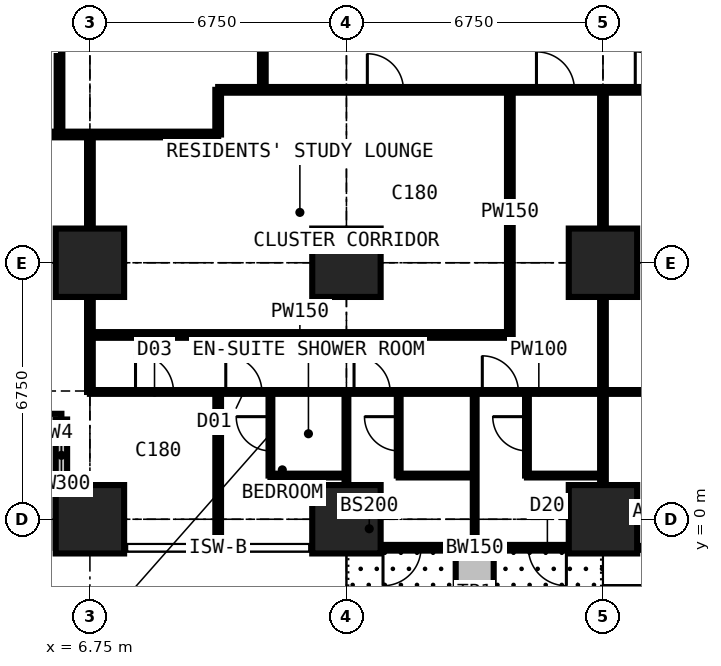
"""IFC4 building model, lengths in metres.
Left out: names, types, materials, properties, quantities, classifications, styles, units other than length and angle.
Written with IfcOpenShell. Run it as: python <this file> out.ifc"""

import sys

from ifc_helpers import new_model, si_unit, direction, frame, frame_2d, origin, origin_2d, place, context, subcontext, project, spatial, rectangle, extrude, element, fill, save


model = new_model("IFC4")
c1 = context("Model", 3, precision=1e-05, world=origin(), true_north=direction((0.0, 1.0)))
c2 = subcontext(c1, "Body", "Model", "MODEL_VIEW")
j1 = project(units=[si_unit("LENGTHUNIT", "METRE"), si_unit("PLANEANGLEUNIT", "RADIAN")], contexts=[c1])
p1 = place(None, origin())
s1 = spatial("IfcSite", under=j1, at=p1, CompositionType="ELEMENT")
p2 = place(p1, origin())
s2 = spatial("IfcBuilding", under=s1, at=p2, CompositionType="ELEMENT")
p3 = place(p2, frame((0.0, 0.0, 87.3)))
s3 = spatial("IfcBuildingStorey", under=s2, at=p3, CompositionType="ELEMENT", Elevation=87.3)
for number, where, z_axis, x_axis in (
    (1, (6.75, 0.0, 0.0), (0.0, 0.0, 1.0), (1.0, 0.0, 0.0)),
    (2, (6.75, 6.75, 0.0), (0.0, 0.0, 1.0), (1.0, 0.0, 0.0)),
    (3, (13.5, 0.0, 0.0), (0.0, 0.0, 1.0), (1.0, 0.0, 0.0)),
    (4, (13.5, 6.75, 0.0), (0.0, 0.0, 1.0), (1.0, 0.0, 0.0)),
    (5, (20.25, 0.0, 0.0), (0.0, 0.0, 1.0), (1.0, 0.0, 0.0)),
    (6, (20.25, 6.75, 0.0), (0.0, 0.0, 1.0), (1.0, 0.0, 0.0)),
):
    element("IfcColumn", number, at=place(p3, frame(where, z_axis=z_axis, x_axis=x_axis)), inside=s3, PredefinedType="COLUMN", context=c2, shape_type="SweptSolid", body=[
        extrude(rectangle(XDim=1.8, YDim=1.8, at=origin_2d()), origin(), (0.0, 0.0, 1.0), 3.6),
    ])
p4 = place(p3, frame((2.625, 2.625, 0.0), z_axis=(0.0, 0.0, 1.0), x_axis=(1.0, 0.0, 0.0)))
e7 = element("IfcWall", 7, at=p4, inside=s3, PredefinedType="SOLIDWALL", context=c2, shape_type="SweptSolid", body=[
    extrude(rectangle(XDim=3.375, YDim=0.3, at=frame_2d((1.688, 0.0))), origin(), (0.0, 0.0, 1.0), 3.375),
])
p5 = place(p4, frame((0.788, 0.0, 0.6)))
e8 = element("IfcOpeningElement", 8, at=p5, cuts=e7, PredefinedType="OPENING", context=c2, shape_type="SweptSolid", body=[
    extrude(rectangle(XDim=1.8, YDim=2.1, at=frame_2d((0.9, 1.05))), frame((0.0, 0.16, 0.0), z_axis=(0.0, -1.0, 0.0), x_axis=(1.0, 0.0, 0.0)), (0.0, 0.0, 1.0), 0.32),
])
p6 = place(p3, frame((6.0, 2.625, 0.0), z_axis=(0.0, 0.0, 1.0), x_axis=(0.0, -1.0, 0.0)))
e9 = element("IfcWall", 9, at=p6, inside=s3, PredefinedType="SOLIDWALL", context=c2, shape_type="SweptSolid", body=[
    extrude(rectangle(XDim=3.375, YDim=0.3, at=frame_2d((1.688, 0.0))), origin(), (0.0, 0.0, 1.0), 3.375),
])
p7 = place(p6, frame((0.343, 0.0, 0.9)))
e10 = element("IfcOpeningElement", 10, at=p7, cuts=e9, PredefinedType="OPENING", context=c2, shape_type="SweptSolid", body=[
    extrude(rectangle(XDim=1.2, YDim=1.8, at=frame_2d((0.6, 0.9))), frame((0.0, 0.16, 0.0), z_axis=(0.0, -1.0, 0.0), x_axis=(1.0, 0.0, 0.0)), (0.0, 0.0, 1.0), 0.32),
])
p8 = place(p3, frame((20.25, -0.75, 0.0), z_axis=(0.0, 0.0, 1.0), x_axis=(-1.0, 0.0, 0.0)))
e11 = element("IfcWall", 11, at=p8, inside=s3, PredefinedType="SOLIDWALL", context=c2, shape_type="SweptSolid", body=[
    extrude(rectangle(XDim=6.75, YDim=0.15, at=frame_2d((3.375, 0.0))), origin(), (0.0, 0.0, 1.0), 3.375),
])
p9 = place(p8, frame((0.962, 0.0, 0.0)))
e12 = element("IfcOpeningElement", 12, at=p9, cuts=e11, PredefinedType="OPENING", context=c2, shape_type="SweptSolid", body=[
    extrude(rectangle(XDim=1.0, YDim=2.2, at=frame_2d((0.5, 1.1))), frame((0.0, 0.085, 0.0), z_axis=(0.0, -1.0, 0.0), x_axis=(1.0, 0.0, 0.0)), (0.0, 0.0, 1.0), 0.17),
])
p10 = place(p8, frame((2.025, 0.0, 0.9)))
e13 = element("IfcOpeningElement", 13, at=p10, cuts=e11, PredefinedType="OPENING", context=c2, shape_type="SweptSolid", body=[
    extrude(rectangle(XDim=1.2, YDim=1.8, at=frame_2d((0.6, 0.9))), frame((0.0, 0.085, 0.0), z_axis=(0.0, -1.0, 0.0), x_axis=(1.0, 0.0, 0.0)), (0.0, 0.0, 1.0), 0.17),
])
p11 = place(p8, frame((4.788, 0.0, 0.0)))
e14 = element("IfcOpeningElement", 14, at=p11, cuts=e11, PredefinedType="OPENING", context=c2, shape_type="SweptSolid", body=[
    extrude(rectangle(XDim=1.0, YDim=2.2, at=frame_2d((0.5, 1.1))), frame((0.0, 0.085, 0.0), z_axis=(0.0, -1.0, 0.0), x_axis=(1.0, 0.0, 0.0)), (0.0, 0.0, 1.0), 0.17),
])
p12 = place(p8, frame((3.525, 0.0, 0.9)))
e15 = element("IfcOpeningElement", 15, at=p12, cuts=e11, PredefinedType="OPENING", context=c2, shape_type="SweptSolid", body=[
    extrude(rectangle(XDim=1.2, YDim=1.8, at=frame_2d((0.6, 0.9))), frame((0.0, 0.085, 0.0), z_axis=(0.0, -1.0, 0.0), x_axis=(1.0, 0.0, 0.0)), (0.0, 0.0, 1.0), 0.17),
])
p13 = place(p3, frame((16.875, -0.85, 0.0), z_axis=(0.0, 0.0, 1.0), x_axis=(0.0, -1.0, 0.0)))
e16 = element("IfcWall", 16, at=p13, inside=s3, PredefinedType="USERDEFINED", context=c2, shape_type="SweptSolid", body=[
    extrude(rectangle(XDim=2.2, YDim=1.0, at=frame_2d((1.1, 0.0))), origin(), (0.0, 0.0, 1.0), 0.9),
])
p14 = place(p3, frame((-0.734, 10.125, 0.0), z_axis=(0.0, 0.0, 1.0), x_axis=(1.0, 0.0, 0.0)))
e17 = element("IfcWall", 17, at=p14, inside=s3, PredefinedType="PARTITIONING", context=c2, shape_type="SweptSolid", body=[
    extrude(rectangle(XDim=10.859, YDim=0.15, at=frame_2d((5.429, 0.0))), origin(), (0.0, 0.0, 1.0), 3.375),
])
p15 = place(p3, frame((5.95, 10.125, 0.0), z_axis=(0.0, 0.0, 1.0), x_axis=(0.0, 1.0, 0.0)))
e18 = element("IfcWall", 18, at=p15, inside=s3, PredefinedType="PARTITIONING", context=c2, shape_type="SweptSolid", body=[
    extrude(rectangle(XDim=2.65, YDim=0.15, at=frame_2d((1.325, 0.0))), origin(), (0.0, 0.0, 1.0), 3.375),
])
p16 = place(p3, frame((6.75, 3.35, 0.0), z_axis=(0.0, 0.0, 1.0), x_axis=(0.0, 1.0, 0.0)))
e19 = element("IfcWall", 19, at=p16, inside=s3, PredefinedType="PARTITIONING", context=c2, shape_type="SweptSolid", body=[
    extrude(rectangle(XDim=6.775, YDim=0.15, at=frame_2d((3.387, 0.0))), origin(), (0.0, 0.0, 1.0), 2.877),
])
p17 = place(p3, frame((6.75, 3.35, 0.0), z_axis=(0.0, 0.0, 1.0), x_axis=(1.0, 0.0, 0.0)))
e20 = element("IfcWall", 20, at=p17, inside=s3, PredefinedType="PARTITIONING", context=c2, shape_type="SweptSolid", body=[
    extrude(rectangle(XDim=23.625, YDim=0.1, at=frame_2d((11.812, 0.0))), origin(), (0.0, 0.0, 1.0), 3.375),
])
p18 = place(p17, frame((1.2, 0.0, 0.0)))
e21 = element("IfcOpeningElement", 21, at=p18, cuts=e20, PredefinedType="OPENING", context=c2, shape_type="SweptSolid", body=[
    extrude(rectangle(XDim=1.0, YDim=2.2, at=frame_2d((0.5, 1.1))), frame((0.0, 0.06, 0.0), z_axis=(0.0, -1.0, 0.0), x_axis=(1.0, 0.0, 0.0)), (0.0, 0.0, 1.0), 0.12),
])
p19 = place(p17, frame((3.575, 0.0, 0.0)))
e22 = element("IfcOpeningElement", 22, at=p19, cuts=e20, PredefinedType="OPENING", context=c2, shape_type="SweptSolid", body=[
    extrude(rectangle(XDim=0.95, YDim=2.2, at=frame_2d((0.475, 1.1))), frame((0.0, 0.06, 0.0), z_axis=(0.0, -1.0, 0.0), x_axis=(1.0, 0.0, 0.0)), (0.0, 0.0, 1.0), 0.12),
])
p20 = place(p17, frame((6.95, 0.0, 0.0)))
e23 = element("IfcOpeningElement", 23, at=p20, cuts=e20, PredefinedType="OPENING", context=c2, shape_type="SweptSolid", body=[
    extrude(rectangle(XDim=0.95, YDim=2.2, at=frame_2d((0.475, 1.1))), frame((0.0, 0.06, 0.0), z_axis=(0.0, -1.0, 0.0), x_axis=(1.0, 0.0, 0.0)), (0.0, 0.0, 1.0), 0.12),
])
p21 = place(p17, frame((10.325, 0.0, 0.0)))
e24 = element("IfcOpeningElement", 24, at=p21, cuts=e20, PredefinedType="OPENING", context=c2, shape_type="SweptSolid", body=[
    extrude(rectangle(XDim=0.95, YDim=2.2, at=frame_2d((0.475, 1.1))), frame((0.0, 0.06, 0.0), z_axis=(0.0, -1.0, 0.0), x_axis=(1.0, 0.0, 0.0)), (0.0, 0.0, 1.0), 0.12),
])
p22 = place(p17, frame((15.1, 0.0, 0.0)))
e25 = element("IfcOpeningElement", 25, at=p22, cuts=e20, PredefinedType="OPENING", context=c2, shape_type="SweptSolid", body=[
    extrude(rectangle(XDim=0.95, YDim=2.2, at=frame_2d((0.475, 1.1))), frame((0.0, 0.06, 0.0), z_axis=(0.0, -1.0, 0.0), x_axis=(1.0, 0.0, 0.0)), (0.0, 0.0, 1.0), 0.12),
])
p23 = place(p17, frame((20.45, 0.0, 0.0)))
e26 = element("IfcOpeningElement", 26, at=p23, cuts=e20, PredefinedType="OPENING", context=c2, shape_type="SweptSolid", body=[
    extrude(rectangle(XDim=0.95, YDim=2.2, at=frame_2d((0.475, 1.1))), frame((0.0, 0.06, 0.0), z_axis=(0.0, -1.0, 0.0), x_axis=(1.0, 0.0, 0.0)), (0.0, 0.0, 1.0), 0.12),
])
p24 = place(p3, frame((6.75, 4.85, 0.0), z_axis=(0.0, 0.0, 1.0), x_axis=(1.0, 0.0, 0.0)))
e27 = element("IfcWall", 27, at=p24, inside=s3, PredefinedType="PARTITIONING", context=c2, shape_type="SweptSolid", body=[
    extrude(rectangle(XDim=11.05, YDim=0.15, at=frame_2d((5.525, 0.0))), origin(), (0.0, 0.0, 1.0), 3.375),
])
p25 = place(p3, frame((10.125, -0.734, 0.0), z_axis=(0.0, 0.0, 1.0), x_axis=(0.0, 1.0, 0.0)))
e28 = element("IfcWall", 28, at=p25, inside=s3, PredefinedType="PARTITIONING", context=c2, shape_type="SweptSolid", body=[
    extrude(rectangle(XDim=4.084, YDim=0.15, at=frame_2d((2.042, 0.0))), origin(), (0.0, 0.0, 1.0), 3.375),
])
p26 = place(p3, frame((10.125, 10.125, 0.0), z_axis=(0.0, 0.0, 1.0), x_axis=(0.0, 1.0, 0.0)))
e29 = element("IfcWall", 29, at=p26, inside=s3, PredefinedType="PARTITIONING", context=c2, shape_type="SweptSolid", body=[
    extrude(rectangle(XDim=1.175, YDim=0.15, at=frame_2d((0.587, 0.0))), origin(), (0.0, 0.0, 1.0), 3.375),
])
p27 = place(p3, frame((10.125, 11.3, 0.0), z_axis=(0.0, 0.0, 1.0), x_axis=(1.0, 0.0, 0.0)))
e30 = element("IfcWall", 30, at=p27, inside=s3, PredefinedType="PARTITIONING", context=c2, shape_type="SweptSolid", body=[
    extrude(rectangle(XDim=20.675, YDim=0.15, at=frame_2d((10.337, 0.0))), origin(), (0.0, 0.0, 1.0), 3.375),
])
p28 = place(p27, frame((8.375, 0.0, 0.0)))
e31 = element("IfcOpeningElement", 31, at=p28, cuts=e30, PredefinedType="OPENING", context=c2, shape_type="SweptSolid", body=[
    extrude(rectangle(XDim=1.0, YDim=2.2, at=frame_2d((0.5, 1.1))), frame((0.0, 0.085, 0.0), z_axis=(0.0, -1.0, 0.0), x_axis=(1.0, 0.0, 0.0)), (0.0, 0.0, 1.0), 0.17),
])
p29 = place(p27, frame((10.975, 0.0, 0.0)))
e32 = element("IfcOpeningElement", 32, at=p29, cuts=e30, PredefinedType="OPENING", context=c2, shape_type="SweptSolid", body=[
    extrude(rectangle(XDim=1.0, YDim=2.2, at=frame_2d((0.5, 1.1))), frame((0.0, 0.085, 0.0), z_axis=(0.0, -1.0, 0.0), x_axis=(1.0, 0.0, 0.0)), (0.0, 0.0, 1.0), 0.17),
])
p30 = place(p27, frame((3.925, 0.0, 0.0)))
e33 = element("IfcOpeningElement", 33, at=p30, cuts=e30, PredefinedType="OPENING", context=c2, shape_type="SweptSolid", body=[
    extrude(rectangle(XDim=0.95, YDim=2.2, at=frame_2d((0.475, 1.1))), frame((0.0, 0.085, 0.0), z_axis=(0.0, -1.0, 0.0), x_axis=(1.0, 0.0, 0.0)), (0.0, 0.0, 1.0), 0.17),
])
p31 = place(p3, frame((11.3, 11.3, 0.0), z_axis=(0.0, 0.0, 1.0), x_axis=(0.0, 1.0, 0.0)))
e34 = element("IfcWall", 34, at=p31, inside=s3, PredefinedType="PARTITIONING", context=c2, shape_type="SweptSolid", body=[
    extrude(rectangle(XDim=19.3, YDim=0.15, at=frame_2d((9.65, 0.0))), origin(), (0.0, 0.0, 1.0), 3.375),
])
p32 = place(p31, frame((18.1, 0.0, 0.0)))
e35 = element("IfcOpeningElement", 35, at=p32, cuts=e34, PredefinedType="OPENING", context=c2, shape_type="SweptSolid", body=[
    extrude(rectangle(XDim=1.0, YDim=2.2, at=frame_2d((0.5, 1.1))), frame((0.0, 0.085, 0.0), z_axis=(0.0, -1.0, 0.0), x_axis=(1.0, 0.0, 0.0)), (0.0, 0.0, 1.0), 0.17),
])
p33 = place(p31, frame((10.137, 0.0, 0.0)))
e36 = element("IfcOpeningElement", 36, at=p33, cuts=e34, PredefinedType="OPENING", context=c2, shape_type="SweptSolid", body=[
    extrude(rectangle(XDim=1.0, YDim=2.2, at=frame_2d((0.5, 1.1))), frame((0.0, 0.085, 0.0), z_axis=(0.0, -1.0, 0.0), x_axis=(1.0, 0.0, 0.0)), (0.0, 0.0, 1.0), 0.17),
])
p34 = place(p3, frame((11.5, 1.15, 0.0), z_axis=(0.0, 0.0, 1.0), x_axis=(0.0, 1.0, 0.0)))
e37 = element("IfcWall", 37, at=p34, inside=s3, PredefinedType="PARTITIONING", context=c2, shape_type="SweptSolid", body=[
    extrude(rectangle(XDim=2.2, YDim=0.1, at=frame_2d((1.1, 0.0))), origin(), (0.0, 0.0, 1.0), 3.375),
])
p35 = place(p34, frame((0.65, 0.0, 0.0)))
e38 = element("IfcOpeningElement", 38, at=p35, cuts=e37, PredefinedType="OPENING", context=c2, shape_type="SweptSolid", body=[
    extrude(rectangle(XDim=0.9, YDim=2.2, at=frame_2d((0.45, 1.1))), frame((0.0, 0.06, 0.0), z_axis=(0.0, -1.0, 0.0), x_axis=(1.0, 0.0, 0.0)), (0.0, 0.0, 1.0), 0.12),
])
p36 = place(p3, frame((11.5, 1.15, 0.0), z_axis=(0.0, 0.0, 1.0), x_axis=(1.0, 0.0, 0.0)))
e39 = element("IfcWall", 39, at=p36, inside=s3, PredefinedType="PARTITIONING", context=c2, shape_type="SweptSolid", body=[
    extrude(rectangle(XDim=2.0, YDim=0.1, at=frame_2d((1.0, 0.0))), origin(), (0.0, 0.0, 1.0), 3.375),
])
p37 = place(p3, frame((13.5, -0.734, 0.0), z_axis=(0.0, 0.0, 1.0), x_axis=(0.0, 1.0, 0.0)))
e40 = element("IfcWall", 40, at=p37, inside=s3, PredefinedType="PARTITIONING", context=c2, shape_type="SweptSolid", body=[
    extrude(rectangle(XDim=4.084, YDim=0.1, at=frame_2d((2.042, 0.0))), origin(), (0.0, 0.0, 1.0), 2.877),
])
p38 = place(p3, frame((14.875, 1.15, 0.0), z_axis=(0.0, 0.0, 1.0), x_axis=(0.0, 1.0, 0.0)))
e41 = element("IfcWall", 41, at=p38, inside=s3, PredefinedType="PARTITIONING", context=c2, shape_type="SweptSolid", body=[
    extrude(rectangle(XDim=2.2, YDim=0.1, at=frame_2d((1.1, 0.0))), origin(), (0.0, 0.0, 1.0), 3.375),
])
p39 = place(p38, frame((0.65, 0.0, 0.0)))
e42 = element("IfcOpeningElement", 42, at=p39, cuts=e41, PredefinedType="OPENING", context=c2, shape_type="SweptSolid", body=[
    extrude(rectangle(XDim=0.9, YDim=2.2, at=frame_2d((0.45, 1.1))), frame((0.0, 0.06, 0.0), z_axis=(0.0, -1.0, 0.0), x_axis=(1.0, 0.0, 0.0)), (0.0, 0.0, 1.0), 0.12),
])
p40 = place(p3, frame((14.875, 1.15, 0.0), z_axis=(0.0, 0.0, 1.0), x_axis=(1.0, 0.0, 0.0)))
e43 = element("IfcWall", 43, at=p40, inside=s3, PredefinedType="PARTITIONING", context=c2, shape_type="SweptSolid", body=[
    extrude(rectangle(XDim=2.0, YDim=0.1, at=frame_2d((1.0, 0.0))), origin(), (0.0, 0.0, 1.0), 3.375),
])
p41 = place(p3, frame((16.875, -0.734, 0.0), z_axis=(0.0, 0.0, 1.0), x_axis=(0.0, 1.0, 0.0)))
e44 = element("IfcWall", 44, at=p41, inside=s3, PredefinedType="PARTITIONING", context=c2, shape_type="SweptSolid", body=[
    extrude(rectangle(XDim=4.084, YDim=0.1, at=frame_2d((2.042, 0.0))), origin(), (0.0, 0.0, 1.0), 3.375),
])
p42 = place(p3, frame((17.8, 4.85, 0.0), z_axis=(0.0, 0.0, 1.0), x_axis=(0.0, 1.0, 0.0)))
e45 = element("IfcWall", 45, at=p42, inside=s3, PredefinedType="PARTITIONING", context=c2, shape_type="SweptSolid", body=[
    extrude(rectangle(XDim=6.45, YDim=0.15, at=frame_2d((3.225, 0.0))), origin(), (0.0, 0.0, 1.0), 3.375),
])
p43 = place(p3, frame((18.25, 1.15, 0.0), z_axis=(0.0, 0.0, 1.0), x_axis=(0.0, 1.0, 0.0)))
e46 = element("IfcWall", 46, at=p43, inside=s3, PredefinedType="PARTITIONING", context=c2, shape_type="SweptSolid", body=[
    extrude(rectangle(XDim=2.2, YDim=0.1, at=frame_2d((1.1, 0.0))), origin(), (0.0, 0.0, 1.0), 3.375),
])
p44 = place(p43, frame((0.65, 0.0, 0.0)))
e47 = element("IfcOpeningElement", 47, at=p44, cuts=e46, PredefinedType="OPENING", context=c2, shape_type="SweptSolid", body=[
    extrude(rectangle(XDim=0.9, YDim=2.2, at=frame_2d((0.45, 1.1))), frame((0.0, 0.06, 0.0), z_axis=(0.0, -1.0, 0.0), x_axis=(1.0, 0.0, 0.0)), (0.0, 0.0, 1.0), 0.12),
])
p45 = place(p3, frame((18.25, 1.15, 0.0), z_axis=(0.0, 0.0, 1.0), x_axis=(1.0, 0.0, 0.0)))
e48 = element("IfcWall", 48, at=p45, inside=s3, PredefinedType="PARTITIONING", context=c2, shape_type="SweptSolid", body=[
    extrude(rectangle(XDim=2.0, YDim=0.1, at=frame_2d((1.0, 0.0))), origin(), (0.0, 0.0, 1.0), 3.375),
])
p46 = place(p3, frame((20.25, -0.734, 0.0), z_axis=(0.0, 0.0, 1.0), x_axis=(0.0, 1.0, 0.0)))
e49 = element("IfcWall", 49, at=p46, inside=s3, PredefinedType="PARTITIONING", context=c2, shape_type="SweptSolid", body=[
    extrude(rectangle(XDim=12.034, YDim=0.15, at=frame_2d((6.017, 0.0))), origin(), (0.0, 0.0, 1.0), 2.61),
])
p47 = place(p7, origin())
e50 = element("IfcWindow", 50, at=p47, inside=s3, PartitioningType="SINGLE_PANEL", PredefinedType="WINDOW", context=c2, shape_type="SweptSolid", body=[
    extrude(rectangle(XDim=1.2, YDim=1.8, at=frame_2d((0.6, 0.9))), frame((0.0, 0.03, 0.0), z_axis=(0.0, -1.0, 0.0), x_axis=(1.0, 0.0, 0.0)), (0.0, 0.0, 1.0), 0.06),
])
fill(e10, e50)
p48 = place(p9, origin())
e51 = element("IfcDoor", 51, at=p48, inside=s3, OperationType="SINGLE_SWING_LEFT", PredefinedType="DOOR", context=c2, shape_type="SweptSolid", body=[
    extrude(rectangle(XDim=1.0, YDim=2.2, at=frame_2d((0.5, 1.1))), frame((0.0, 0.025, 0.0), z_axis=(0.0, -1.0, 0.0), x_axis=(1.0, 0.0, 0.0)), (0.0, 0.0, 1.0), 0.05),
])
fill(e12, e51)
p49 = place(p10, origin())
e52 = element("IfcWindow", 52, at=p49, inside=s3, PartitioningType="SINGLE_PANEL", PredefinedType="WINDOW", context=c2, shape_type="SweptSolid", body=[
    extrude(rectangle(XDim=1.2, YDim=1.8, at=frame_2d((0.6, 0.9))), frame((0.0, 0.03, 0.0), z_axis=(0.0, -1.0, 0.0), x_axis=(1.0, 0.0, 0.0)), (0.0, 0.0, 1.0), 0.06),
])
fill(e13, e52)
p50 = place(p11, origin())
e53 = element("IfcDoor", 53, at=p50, inside=s3, OperationType="SINGLE_SWING_RIGHT", PredefinedType="DOOR", context=c2, shape_type="SweptSolid", body=[
    extrude(rectangle(XDim=1.0, YDim=2.2, at=frame_2d((0.5, 1.1))), frame((0.0, 0.025, 0.0), z_axis=(0.0, -1.0, 0.0), x_axis=(1.0, 0.0, 0.0)), (0.0, 0.0, 1.0), 0.05),
])
fill(e14, e53)
p51 = place(p12, origin())
e54 = element("IfcWindow", 54, at=p51, inside=s3, PartitioningType="SINGLE_PANEL", PredefinedType="WINDOW", context=c2, shape_type="SweptSolid", body=[
    extrude(rectangle(XDim=1.2, YDim=1.8, at=frame_2d((0.6, 0.9))), frame((0.0, 0.03, 0.0), z_axis=(0.0, -1.0, 0.0), x_axis=(1.0, 0.0, 0.0)), (0.0, 0.0, 1.0), 0.06),
])
fill(e15, e54)
p52 = place(p18, origin())
e55 = element("IfcDoor", 55, at=p52, inside=s3, OperationType="SINGLE_SWING_LEFT", PredefinedType="DOOR", context=c2, shape_type="SweptSolid", body=[
    extrude(rectangle(XDim=1.0, YDim=2.2, at=frame_2d((0.5, 1.1))), frame((0.0, 0.025, 0.0), z_axis=(0.0, -1.0, 0.0), x_axis=(1.0, 0.0, 0.0)), (0.0, 0.0, 1.0), 0.05),
])
fill(e21, e55)
p53 = place(p19, origin())
e56 = element("IfcDoor", 56, at=p53, inside=s3, OperationType="SINGLE_SWING_LEFT", PredefinedType="DOOR", context=c2, shape_type="SweptSolid", body=[
    extrude(rectangle(XDim=0.95, YDim=2.2, at=frame_2d((0.475, 1.1))), frame((0.0, 0.025, 0.0), z_axis=(0.0, -1.0, 0.0), x_axis=(1.0, 0.0, 0.0)), (0.0, 0.0, 1.0), 0.05),
])
fill(e22, e56)
p54 = place(p35, origin())
e57 = element("IfcDoor", 57, at=p54, inside=s3, OperationType="SINGLE_SWING_RIGHT", PredefinedType="DOOR", context=c2, shape_type="SweptSolid", body=[
    extrude(rectangle(XDim=0.9, YDim=2.2, at=frame_2d((0.45, 1.1))), frame((0.0, 0.025, 0.0), z_axis=(0.0, -1.0, 0.0), x_axis=(1.0, 0.0, 0.0)), (0.0, 0.0, 1.0), 0.05),
])
fill(e38, e57)
p55 = place(p20, origin())
e58 = element("IfcDoor", 58, at=p55, inside=s3, OperationType="SINGLE_SWING_LEFT", PredefinedType="DOOR", context=c2, shape_type="SweptSolid", body=[
    extrude(rectangle(XDim=0.95, YDim=2.2, at=frame_2d((0.475, 1.1))), frame((0.0, 0.025, 0.0), z_axis=(0.0, -1.0, 0.0), x_axis=(1.0, 0.0, 0.0)), (0.0, 0.0, 1.0), 0.05),
])
fill(e23, e58)
p56 = place(p39, origin())
e59 = element("IfcDoor", 59, at=p56, inside=s3, OperationType="SINGLE_SWING_RIGHT", PredefinedType="DOOR", context=c2, shape_type="SweptSolid", body=[
    extrude(rectangle(XDim=0.9, YDim=2.2, at=frame_2d((0.45, 1.1))), frame((0.0, 0.025, 0.0), z_axis=(0.0, -1.0, 0.0), x_axis=(1.0, 0.0, 0.0)), (0.0, 0.0, 1.0), 0.05),
])
fill(e42, e59)
p57 = place(p21, origin())
e60 = element("IfcDoor", 60, at=p57, inside=s3, OperationType="SINGLE_SWING_LEFT", PredefinedType="DOOR", context=c2, shape_type="SweptSolid", body=[
    extrude(rectangle(XDim=0.95, YDim=2.2, at=frame_2d((0.475, 1.1))), frame((0.0, 0.025, 0.0), z_axis=(0.0, -1.0, 0.0), x_axis=(1.0, 0.0, 0.0)), (0.0, 0.0, 1.0), 0.05),
])
fill(e24, e60)
p58 = place(p44, origin())
e61 = element("IfcDoor", 61, at=p58, inside=s3, OperationType="SINGLE_SWING_RIGHT", PredefinedType="DOOR", context=c2, shape_type="SweptSolid", body=[
    extrude(rectangle(XDim=0.9, YDim=2.2, at=frame_2d((0.45, 1.1))), frame((0.0, 0.025, 0.0), z_axis=(0.0, -1.0, 0.0), x_axis=(1.0, 0.0, 0.0)), (0.0, 0.0, 1.0), 0.05),
])
fill(e47, e61)
p59 = place(p28, origin())
e62 = element("IfcDoor", 62, at=p59, inside=s3, OperationType="SINGLE_SWING_LEFT", PredefinedType="DOOR", context=c2, shape_type="SweptSolid", body=[
    extrude(rectangle(XDim=1.0, YDim=2.2, at=frame_2d((0.5, 1.1))), frame((0.0, 0.025, 0.0), z_axis=(0.0, -1.0, 0.0), x_axis=(1.0, 0.0, 0.0)), (0.0, 0.0, 1.0), 0.05),
])
fill(e31, e62)
p60 = place(p29, origin())
e63 = element("IfcDoor", 63, at=p60, inside=s3, OperationType="SINGLE_SWING_LEFT", PredefinedType="DOOR", context=c2, shape_type="SweptSolid", body=[
    extrude(rectangle(XDim=1.0, YDim=2.2, at=frame_2d((0.5, 1.1))), frame((0.0, 0.025, 0.0), z_axis=(0.0, -1.0, 0.0), x_axis=(1.0, 0.0, 0.0)), (0.0, 0.0, 1.0), 0.05),
])
fill(e32, e63)
p61 = place(p30, origin())
e64 = element("IfcDoor", 64, at=p61, inside=s3, OperationType="SINGLE_SWING_LEFT", PredefinedType="DOOR", context=c2, shape_type="SweptSolid", body=[
    extrude(rectangle(XDim=0.95, YDim=2.2, at=frame_2d((0.475, 1.1))), frame((0.0, 0.025, 0.0), z_axis=(0.0, -1.0, 0.0), x_axis=(1.0, 0.0, 0.0)), (0.0, 0.0, 1.0), 0.05),
])
fill(e33, e64)
save(model, sys.argv[1])
